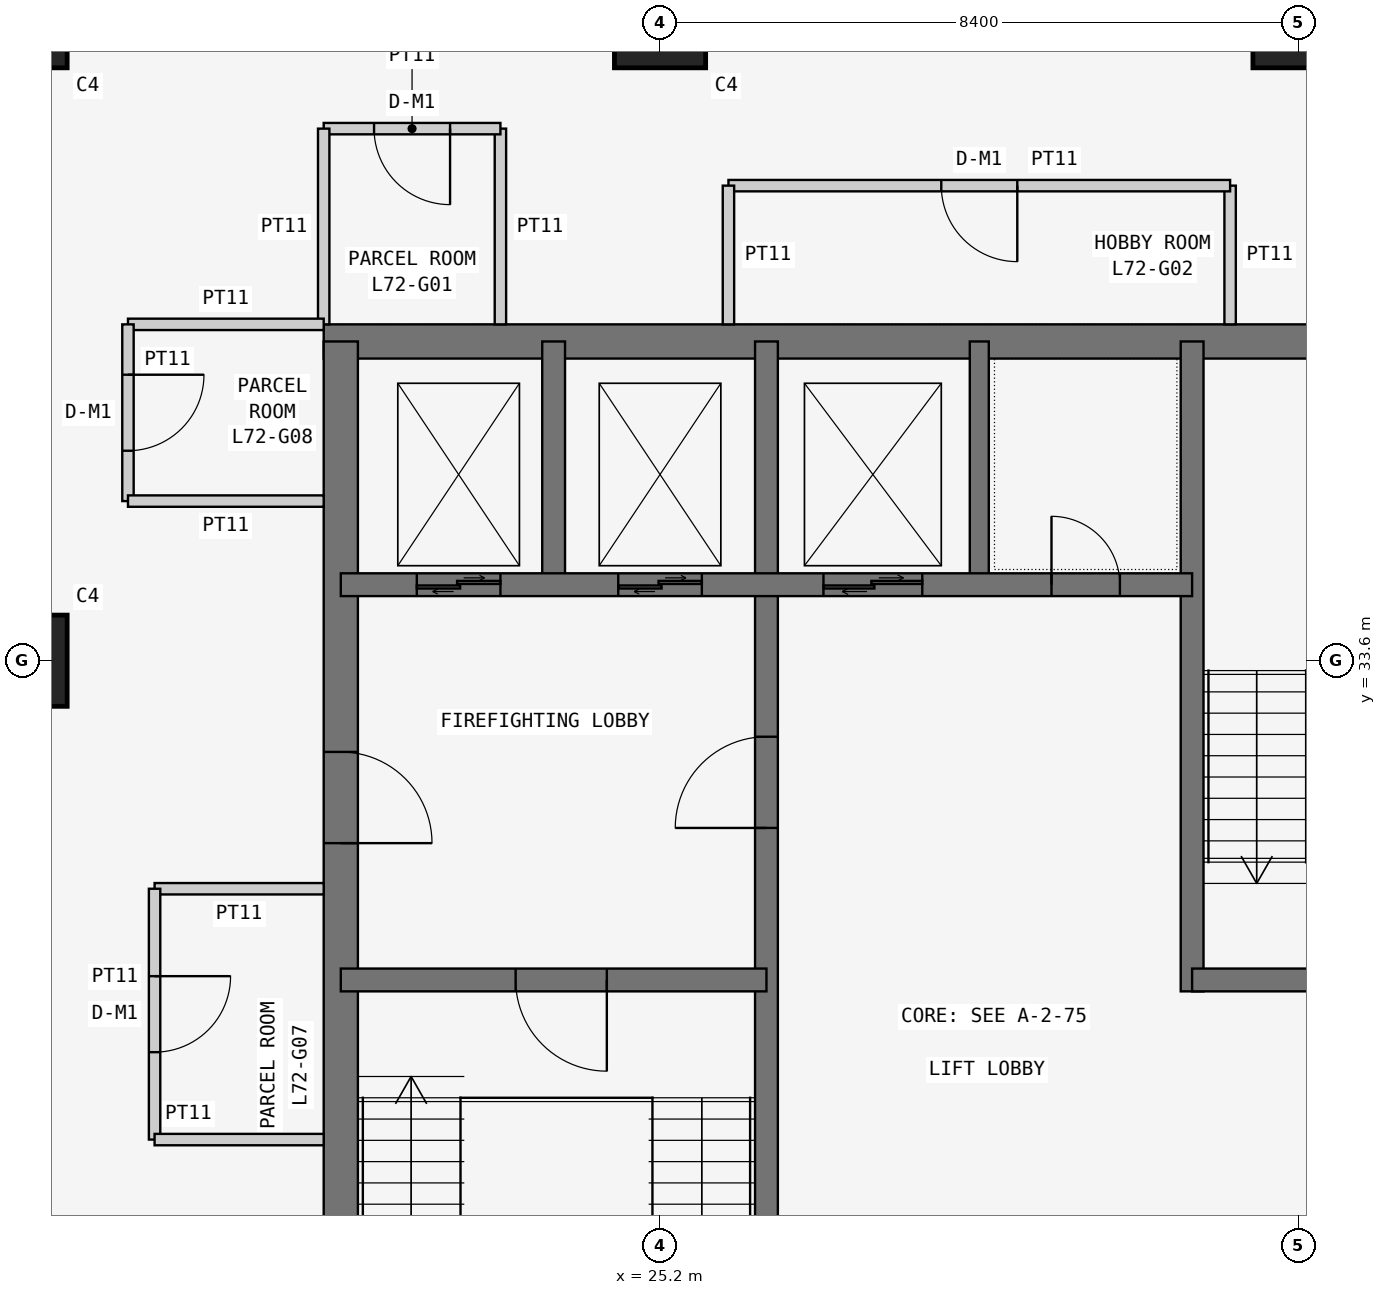
"""IFC4 building model, lengths in metres.
Left out: names, types, materials, properties, quantities, classifications, styles, units other than length and angle.
Written with IfcOpenShell. Run it as: python <this file> out.ifc"""

import sys

from ifc_helpers import new_model, si_unit, direction, frame, frame_2d, origin, origin_2d, place, context, subcontext, project, spatial, rectangle, extrude, element, fill, save


model = new_model("IFC4")
c1 = context("Model", 3, precision=1e-05, world=origin(), true_north=direction((0.0, 1.0)))
c2 = subcontext(c1, "Body", "Model", "MODEL_VIEW")
j1 = project(units=[si_unit("LENGTHUNIT", "METRE"), si_unit("PLANEANGLEUNIT", "RADIAN")], contexts=[c1])
p1 = place(None, origin())
s1 = spatial("IfcSite", under=j1, at=p1, CompositionType="ELEMENT")
p2 = place(p1, origin())
s2 = spatial("IfcBuilding", under=s1, at=p2, CompositionType="ELEMENT")
p3 = place(p2, frame((0.0, 0.0, 275.7)))
s3 = spatial("IfcBuildingStorey", under=s2, at=p3, CompositionType="ELEMENT", Elevation=275.7)
for number, where, z_axis, x_axis in (
    (1, (16.8, 33.6, 0.0), (0.0, 0.0, 1.0), (1.0, 0.0, 0.0)),
    (2, (16.8, 42.0, 0.0), (0.0, 0.0, 1.0), (1.0, 0.0, 0.0)),
    (3, (25.2, 42.0, 0.0), (0.0, 0.0, 1.0), (1.0, 0.0, 0.0)),
    (4, (33.6, 42.0, 0.0), (0.0, 0.0, 1.0), (1.0, 0.0, 0.0)),
):
    element("IfcColumn", number, at=place(p3, frame(where, z_axis=z_axis, x_axis=x_axis)), inside=s3, PredefinedType="COLUMN", context=c2, shape_type="SweptSolid", body=[
        extrude(rectangle(XDim=1.2, YDim=1.2, at=origin_2d()), origin(), (0.0, 0.0, 1.0), 3.6),
    ])
p4 = place(p3, frame((37.8, 37.8, 0.0), z_axis=(0.0, 0.0, 1.0), x_axis=(-1.0, 0.0, 0.0)))
e5 = element("IfcWall", 5, at=p4, inside=s3, PredefinedType="SHEAR", context=c2, shape_type="SweptSolid", body=[
    extrude(rectangle(XDim=17.025, YDim=0.45, at=frame_2d((8.513, 0.0))), origin(), (0.0, 0.0, 1.0), 3.6),
])
p5 = place(p3, frame((21.0, 37.8, 0.0), z_axis=(0.0, 0.0, 1.0), x_axis=(0.0, -1.0, 0.0)))
e6 = element("IfcWall", 6, at=p5, inside=s3, PredefinedType="SHEAR", context=c2, shape_type="SweptSolid", body=[
    extrude(rectangle(XDim=17.025, YDim=0.45, at=frame_2d((8.513, 0.0))), origin(), (0.0, 0.0, 1.0), 3.6),
])
p6 = place(p5, frame((5.4, 0.0, 0.0)))
e7 = element("IfcOpeningElement", 7, at=p6, cuts=e6, PredefinedType="OPENING", context=c2, shape_type="SweptSolid", body=[
    extrude(rectangle(XDim=1.2, YDim=2.1, at=frame_2d((0.6, 1.05))), frame((0.0, 0.235, 0.0), z_axis=(0.0, -1.0, 0.0), x_axis=(1.0, 0.0, 0.0)), (0.0, 0.0, 1.0), 0.47),
])
p7 = place(p3, frame((26.6, 21.0, 0.0), z_axis=(0.0, 0.0, 1.0), x_axis=(0.0, 1.0, 0.0)))
e8 = element("IfcWall", 8, at=p7, inside=s3, PredefinedType="SHEAR", context=c2, shape_type="SweptSolid", body=[
    extrude(rectangle(XDim=16.8, YDim=0.3, at=frame_2d((8.4, 0.0))), origin(), (0.0, 0.0, 1.0), 3.6),
])
p8 = place(p7, frame((10.4, 0.0, 0.0)))
e9 = element("IfcOpeningElement", 9, at=p8, cuts=e8, PredefinedType="OPENING", context=c2, shape_type="SweptSolid", body=[
    extrude(rectangle(XDim=1.2, YDim=2.1, at=frame_2d((0.6, 1.05))), frame((0.0, 0.16, 0.0), z_axis=(0.0, -1.0, 0.0), x_axis=(1.0, 0.0, 0.0)), (0.0, 0.0, 1.0), 0.32),
])
p9 = place(p3, frame((21.0, 29.4, 0.0), z_axis=(0.0, 0.0, 1.0), x_axis=(1.0, 0.0, 0.0)))
e10 = element("IfcWall", 10, at=p9, inside=s3, PredefinedType="SHEAR", context=c2, shape_type="SweptSolid", body=[
    extrude(rectangle(XDim=5.6, YDim=0.3, at=frame_2d((2.8, 0.0))), origin(), (0.0, 0.0, 1.0), 3.6),
])
p10 = place(p9, frame((2.3, 0.0, 0.0)))
e11 = element("IfcOpeningElement", 11, at=p10, cuts=e10, PredefinedType="OPENING", context=c2, shape_type="SweptSolid", body=[
    extrude(rectangle(XDim=1.2, YDim=2.1, at=frame_2d((0.6, 1.05))), frame((0.0, 0.16, 0.0), z_axis=(0.0, -1.0, 0.0), x_axis=(1.0, 0.0, 0.0)), (0.0, 0.0, 1.0), 0.32),
])
p11 = place(p3, frame((21.0, 34.6, 0.0), z_axis=(0.0, 0.0, 1.0), x_axis=(1.0, 0.0, 0.0)))
e12 = element("IfcWall", 12, at=p11, inside=s3, PredefinedType="SHEAR", context=c2, shape_type="SweptSolid", body=[
    extrude(rectangle(XDim=11.2, YDim=0.3, at=frame_2d((5.6, 0.0))), origin(), (0.0, 0.0, 1.0), 3.6),
])
p12 = place(p11, frame((9.35, 0.0, 0.0)))
e13 = element("IfcOpeningElement", 13, at=p12, cuts=e12, PredefinedType="OPENING", context=c2, shape_type="SweptSolid", body=[
    extrude(rectangle(XDim=0.9, YDim=2.1, at=frame_2d((0.45, 1.05))), frame((0.0, 0.16, 0.0), z_axis=(0.0, -1.0, 0.0), x_axis=(1.0, 0.0, 0.0)), (0.0, 0.0, 1.0), 0.32),
])
p13 = place(p11, frame((1.0, 0.0, 0.0)))
e14 = element("IfcOpeningElement", 14, at=p13, cuts=e12, PredefinedType="OPENING", context=c2, shape_type="SweptSolid", body=[
    extrude(rectangle(XDim=1.1, YDim=2.1, at=frame_2d((0.55, 1.05))), frame((0.0, 0.16, 0.0), z_axis=(0.0, -1.0, 0.0), x_axis=(1.0, 0.0, 0.0)), (0.0, 0.0, 1.0), 0.32),
])
p14 = place(p11, frame((3.65, 0.0, 0.0)))
e15 = element("IfcOpeningElement", 15, at=p14, cuts=e12, PredefinedType="OPENING", context=c2, shape_type="SweptSolid", body=[
    extrude(rectangle(XDim=1.1, YDim=2.1, at=frame_2d((0.55, 1.05))), frame((0.0, 0.16, 0.0), z_axis=(0.0, -1.0, 0.0), x_axis=(1.0, 0.0, 0.0)), (0.0, 0.0, 1.0), 0.32),
])
p15 = place(p11, frame((6.35, 0.0, 0.0)))
e16 = element("IfcOpeningElement", 16, at=p15, cuts=e12, PredefinedType="OPENING", context=c2, shape_type="SweptSolid", body=[
    extrude(rectangle(XDim=1.3, YDim=2.1, at=frame_2d((0.65, 1.05))), frame((0.0, 0.16, 0.0), z_axis=(0.0, -1.0, 0.0), x_axis=(1.0, 0.0, 0.0)), (0.0, 0.0, 1.0), 0.32),
])
p16 = place(p3, frame((23.8, 34.6, 0.0), z_axis=(0.0, 0.0, 1.0), x_axis=(0.0, 1.0, 0.0)))
e17 = element("IfcWall", 17, at=p16, inside=s3, PredefinedType="SHEAR", context=c2, shape_type="SweptSolid", body=[
    extrude(rectangle(XDim=3.2, YDim=0.3, at=frame_2d((1.6, 0.0))), origin(), (0.0, 0.0, 1.0), 3.6),
])
p17 = place(p3, frame((32.2, 29.25, 0.0), z_axis=(0.0, 0.0, 1.0), x_axis=(0.0, 1.0, 0.0)))
e18 = element("IfcWall", 18, at=p17, inside=s3, PredefinedType="SHEAR", context=c2, shape_type="SweptSolid", body=[
    extrude(rectangle(XDim=8.55, YDim=0.3, at=frame_2d((4.275, 0.0))), origin(), (0.0, 0.0, 1.0), 3.6),
])
p18 = place(p3, frame((32.2, 29.4, 0.0), z_axis=(0.0, 0.0, 1.0), x_axis=(1.0, 0.0, 0.0)))
e19 = element("IfcWall", 19, at=p18, inside=s3, PredefinedType="SHEAR", context=c2, shape_type="SweptSolid", body=[
    extrude(rectangle(XDim=5.6, YDim=0.3, at=frame_2d((2.8, 0.0))), origin(), (0.0, 0.0, 1.0), 3.6),
])
p19 = place(p18, frame((2.0, 0.0, 0.0)))
e20 = element("IfcOpeningElement", 20, at=p19, cuts=e19, PredefinedType="OPENING", context=c2, shape_type="SweptSolid", body=[
    extrude(rectangle(XDim=1.2, YDim=2.1, at=frame_2d((0.6, 1.05))), frame((0.0, 0.16, 0.0), z_axis=(0.0, -1.0, 0.0), x_axis=(1.0, 0.0, 0.0)), (0.0, 0.0, 1.0), 0.32),
])
p20 = place(p3, frame((29.4, 34.6, 0.0), z_axis=(0.0, 0.0, 1.0), x_axis=(0.0, 1.0, 0.0)))
e21 = element("IfcWall", 21, at=p20, inside=s3, PredefinedType="SHEAR", context=c2, shape_type="SweptSolid", body=[
    extrude(rectangle(XDim=3.2, YDim=0.25, at=frame_2d((1.6, 0.0))), origin(), (0.0, 0.0, 1.0), 3.6),
])
p21 = place(p3, frame((23.1, 38.025, 0.0), z_axis=(0.0, 0.0, 1.0), x_axis=(0.0, 1.0, 0.0)))
e22 = element("IfcWall", 22, at=p21, inside=s3, PredefinedType="PARTITIONING", context=c2, shape_type="SweptSolid", body=[
    extrude(rectangle(XDim=2.575, YDim=0.15, at=frame_2d((1.288, 0.0))), origin(), (0.0, 0.0, 1.0), 3.45),
])
p22 = place(p3, frame((23.1, 40.6, 0.0), z_axis=(0.0, 0.0, 1.0), x_axis=(-1.0, 0.0, 0.0)))
e23 = element("IfcWall", 23, at=p22, inside=s3, PredefinedType="PARTITIONING", context=c2, shape_type="SweptSolid", body=[
    extrude(rectangle(XDim=2.325, YDim=0.15, at=frame_2d((1.163, 0.0))), origin(), (0.0, 0.0, 1.0), 3.45),
])
p23 = place(p22, frame((0.663, 0.0, 0.0)))
e24 = element("IfcOpeningElement", 24, at=p23, cuts=e23, PredefinedType="OPENING", context=c2, shape_type="SweptSolid", body=[
    extrude(rectangle(XDim=1.0, YDim=2.1, at=frame_2d((0.5, 1.05))), frame((0.0, 0.085, 0.0), z_axis=(0.0, -1.0, 0.0), x_axis=(1.0, 0.0, 0.0)), (0.0, 0.0, 1.0), 0.17),
])
p24 = place(p3, frame((20.775, 40.6, 0.0), z_axis=(0.0, 0.0, 1.0), x_axis=(0.0, -1.0, 0.0)))
e25 = element("IfcWall", 25, at=p24, inside=s3, PredefinedType="PARTITIONING", context=c2, shape_type="SweptSolid", body=[
    extrude(rectangle(XDim=2.575, YDim=0.15, at=frame_2d((1.288, 0.0))), origin(), (0.0, 0.0, 1.0), 3.45),
])
p25 = place(p3, frame((32.7, 38.025, 0.0), z_axis=(0.0, 0.0, 1.0), x_axis=(0.0, 1.0, 0.0)))
e26 = element("IfcWall", 26, at=p25, inside=s3, PredefinedType="PARTITIONING", context=c2, shape_type="SweptSolid", body=[
    extrude(rectangle(XDim=1.825, YDim=0.15, at=frame_2d((0.913, 0.0))), origin(), (0.0, 0.0, 1.0), 3.45),
])
p26 = place(p3, frame((32.7, 39.85, 0.0), z_axis=(0.0, 0.0, 1.0), x_axis=(-1.0, 0.0, 0.0)))
e27 = element("IfcWall", 27, at=p26, inside=s3, PredefinedType="PARTITIONING", context=c2, shape_type="SweptSolid", body=[
    extrude(rectangle(XDim=6.6, YDim=0.15, at=frame_2d((3.3, 0.0))), origin(), (0.0, 0.0, 1.0), 3.45),
])
p27 = place(p26, frame((2.8, 0.0, 0.0)))
e28 = element("IfcOpeningElement", 28, at=p27, cuts=e27, PredefinedType="OPENING", context=c2, shape_type="SweptSolid", body=[
    extrude(rectangle(XDim=1.0, YDim=2.1, at=frame_2d((0.5, 1.05))), frame((0.0, 0.085, 0.0), z_axis=(0.0, -1.0, 0.0), x_axis=(1.0, 0.0, 0.0)), (0.0, 0.0, 1.0), 0.17),
])
p28 = place(p3, frame((26.1, 39.85, 0.0), z_axis=(0.0, 0.0, 1.0), x_axis=(0.0, -1.0, 0.0)))
e29 = element("IfcWall", 29, at=p28, inside=s3, PredefinedType="PARTITIONING", context=c2, shape_type="SweptSolid", body=[
    extrude(rectangle(XDim=1.825, YDim=0.15, at=frame_2d((0.913, 0.0))), origin(), (0.0, 0.0, 1.0), 3.45),
])
p29 = place(p3, frame((20.775, 30.6, 0.0), z_axis=(0.0, 0.0, 1.0), x_axis=(-1.0, 0.0, 0.0)))
e30 = element("IfcWall", 30, at=p29, inside=s3, PredefinedType="PARTITIONING", context=c2, shape_type="SweptSolid", body=[
    extrude(rectangle(XDim=2.225, YDim=0.15, at=frame_2d((1.112, 0.0))), origin(), (0.0, 0.0, 1.0), 3.45),
])
p30 = place(p3, frame((18.55, 30.6, 0.0), z_axis=(0.0, 0.0, 1.0), x_axis=(0.0, -1.0, 0.0)))
e31 = element("IfcWall", 31, at=p30, inside=s3, PredefinedType="PARTITIONING", context=c2, shape_type="SweptSolid", body=[
    extrude(rectangle(XDim=3.3, YDim=0.15, at=frame_2d((1.65, 0.0))), origin(), (0.0, 0.0, 1.0), 3.45),
])
p31 = place(p30, frame((1.15, 0.0, 0.0)))
e32 = element("IfcOpeningElement", 32, at=p31, cuts=e31, PredefinedType="OPENING", context=c2, shape_type="SweptSolid", body=[
    extrude(rectangle(XDim=1.0, YDim=2.1, at=frame_2d((0.5, 1.05))), frame((0.0, 0.085, 0.0), z_axis=(0.0, -1.0, 0.0), x_axis=(1.0, 0.0, 0.0)), (0.0, 0.0, 1.0), 0.17),
])
p32 = place(p3, frame((18.55, 27.3, 0.0), z_axis=(0.0, 0.0, 1.0), x_axis=(1.0, 0.0, 0.0)))
e33 = element("IfcWall", 33, at=p32, inside=s3, PredefinedType="PARTITIONING", context=c2, shape_type="SweptSolid", body=[
    extrude(rectangle(XDim=2.225, YDim=0.15, at=frame_2d((1.112, 0.0))), origin(), (0.0, 0.0, 1.0), 3.45),
])
p33 = place(p3, frame((20.775, 38.025, 0.0), z_axis=(0.0, 0.0, 1.0), x_axis=(-1.0, 0.0, 0.0)))
e34 = element("IfcWall", 34, at=p33, inside=s3, PredefinedType="PARTITIONING", context=c2, shape_type="SweptSolid", body=[
    extrude(rectangle(XDim=2.575, YDim=0.15, at=frame_2d((1.288, 0.0))), origin(), (0.0, 0.0, 1.0), 3.45),
])
p34 = place(p3, frame((18.2, 38.025, 0.0), z_axis=(0.0, 0.0, 1.0), x_axis=(0.0, -1.0, 0.0)))
e35 = element("IfcWall", 35, at=p34, inside=s3, PredefinedType="PARTITIONING", context=c2, shape_type="SweptSolid", body=[
    extrude(rectangle(XDim=2.325, YDim=0.15, at=frame_2d((1.163, 0.0))), origin(), (0.0, 0.0, 1.0), 3.45),
])
p35 = place(p34, frame((0.663, 0.0, 0.0)))
e36 = element("IfcOpeningElement", 36, at=p35, cuts=e35, PredefinedType="OPENING", context=c2, shape_type="SweptSolid", body=[
    extrude(rectangle(XDim=1.0, YDim=2.1, at=frame_2d((0.5, 1.05))), frame((0.0, 0.085, 0.0), z_axis=(0.0, -1.0, 0.0), x_axis=(1.0, 0.0, 0.0)), (0.0, 0.0, 1.0), 0.17),
])
p36 = place(p3, frame((18.2, 35.7, 0.0), z_axis=(0.0, 0.0, 1.0), x_axis=(1.0, 0.0, 0.0)))
e37 = element("IfcWall", 37, at=p36, inside=s3, PredefinedType="PARTITIONING", context=c2, shape_type="SweptSolid", body=[
    extrude(rectangle(XDim=2.575, YDim=0.15, at=frame_2d((1.288, 0.0))), origin(), (0.0, 0.0, 1.0), 3.45),
])
p37 = place(p23, origin())
e38 = element("IfcDoor", 38, at=p37, inside=s3, OperationType="SINGLE_SWING_LEFT", PredefinedType="DOOR", context=c2, shape_type="SweptSolid", body=[
    extrude(rectangle(XDim=1.0, YDim=2.1, at=frame_2d((0.5, 1.05))), frame((0.0, 0.025, 0.0), z_axis=(0.0, -1.0, 0.0), x_axis=(1.0, 0.0, 0.0)), (0.0, 0.0, 1.0), 0.05),
])
fill(e24, e38)
p38 = place(p27, origin())
e39 = element("IfcDoor", 39, at=p38, inside=s3, OperationType="SINGLE_SWING_LEFT", PredefinedType="DOOR", context=c2, shape_type="SweptSolid", body=[
    extrude(rectangle(XDim=1.0, YDim=2.1, at=frame_2d((0.5, 1.05))), frame((0.0, 0.025, 0.0), z_axis=(0.0, -1.0, 0.0), x_axis=(1.0, 0.0, 0.0)), (0.0, 0.0, 1.0), 0.05),
])
fill(e28, e39)
p39 = place(p31, origin())
e40 = element("IfcDoor", 40, at=p39, inside=s3, OperationType="SINGLE_SWING_LEFT", PredefinedType="DOOR", context=c2, shape_type="SweptSolid", body=[
    extrude(rectangle(XDim=1.0, YDim=2.1, at=frame_2d((0.5, 1.05))), frame((0.0, 0.025, 0.0), z_axis=(0.0, -1.0, 0.0), x_axis=(1.0, 0.0, 0.0)), (0.0, 0.0, 1.0), 0.05),
])
fill(e32, e40)
p40 = place(p35, origin())
e41 = element("IfcDoor", 41, at=p40, inside=s3, OperationType="SINGLE_SWING_LEFT", PredefinedType="DOOR", context=c2, shape_type="SweptSolid", body=[
    extrude(rectangle(XDim=1.0, YDim=2.1, at=frame_2d((0.5, 1.05))), frame((0.0, 0.025, 0.0), z_axis=(0.0, -1.0, 0.0), x_axis=(1.0, 0.0, 0.0)), (0.0, 0.0, 1.0), 0.05),
])
fill(e36, e41)
p41 = place(p6, origin())
e42 = element("IfcDoor", 42, at=p41, inside=s3, OperationType="SINGLE_SWING_RIGHT", PredefinedType="DOOR", context=c2, shape_type="SweptSolid", body=[
    extrude(rectangle(XDim=1.2, YDim=2.1, at=frame_2d((0.6, 1.05))), frame((0.0, 0.025, 0.0), z_axis=(0.0, -1.0, 0.0), x_axis=(1.0, 0.0, 0.0)), (0.0, 0.0, 1.0), 0.05),
])
fill(e7, e42)
p42 = place(p10, frame((1.2, 0.0, 0.0), z_axis=(0.0, 0.0, 1.0), x_axis=(-1.0, 0.0, 0.0)))
e43 = element("IfcDoor", 43, at=p42, inside=s3, OperationType="SINGLE_SWING_LEFT", PredefinedType="DOOR", context=c2, shape_type="SweptSolid", body=[
    extrude(rectangle(XDim=1.2, YDim=2.1, at=frame_2d((0.6, 1.05))), frame((0.0, 0.025, 0.0), z_axis=(0.0, -1.0, 0.0), x_axis=(1.0, 0.0, 0.0)), (0.0, 0.0, 1.0), 0.05),
])
fill(e11, e43)
p43 = place(p8, origin())
e44 = element("IfcDoor", 44, at=p43, inside=s3, OperationType="SINGLE_SWING_LEFT", PredefinedType="DOOR", context=c2, shape_type="SweptSolid", body=[
    extrude(rectangle(XDim=1.2, YDim=2.1, at=frame_2d((0.6, 1.05))), frame((0.0, 0.025, 0.0), z_axis=(0.0, -1.0, 0.0), x_axis=(1.0, 0.0, 0.0)), (0.0, 0.0, 1.0), 0.05),
])
fill(e9, e44)
p44 = place(p12, origin())
e45 = element("IfcDoor", 45, at=p44, inside=s3, OperationType="SINGLE_SWING_LEFT", PredefinedType="DOOR", context=c2, shape_type="SweptSolid", body=[
    extrude(rectangle(XDim=0.9, YDim=2.1, at=frame_2d((0.45, 1.05))), frame((0.0, 0.025, 0.0), z_axis=(0.0, -1.0, 0.0), x_axis=(1.0, 0.0, 0.0)), (0.0, 0.0, 1.0), 0.05),
])
fill(e13, e45)
p45 = place(p13, origin())
e46 = element("IfcDoor", 46, at=p45, inside=s3, OperationType="DOUBLE_DOOR_SLIDING", PredefinedType="DOOR", context=c2, shape_type="SweptSolid", body=[
    extrude(rectangle(XDim=1.1, YDim=2.1, at=frame_2d((0.55, 1.05))), frame((0.0, 0.025, 0.0), z_axis=(0.0, -1.0, 0.0), x_axis=(1.0, 0.0, 0.0)), (0.0, 0.0, 1.0), 0.05),
])
fill(e14, e46)
p46 = place(p14, origin())
e47 = element("IfcDoor", 47, at=p46, inside=s3, OperationType="DOUBLE_DOOR_SLIDING", PredefinedType="DOOR", context=c2, shape_type="SweptSolid", body=[
    extrude(rectangle(XDim=1.1, YDim=2.1, at=frame_2d((0.55, 1.05))), frame((0.0, 0.025, 0.0), z_axis=(0.0, -1.0, 0.0), x_axis=(1.0, 0.0, 0.0)), (0.0, 0.0, 1.0), 0.05),
])
fill(e15, e47)
p47 = place(p15, origin())
e48 = element("IfcDoor", 48, at=p47, inside=s3, OperationType="DOUBLE_DOOR_SLIDING", PredefinedType="DOOR", context=c2, shape_type="SweptSolid", body=[
    extrude(rectangle(XDim=1.3, YDim=2.1, at=frame_2d((0.65, 1.05))), frame((0.0, 0.025, 0.0), z_axis=(0.0, -1.0, 0.0), x_axis=(1.0, 0.0, 0.0)), (0.0, 0.0, 1.0), 0.05),
])
fill(e16, e48)
save(model, sys.argv[1])
